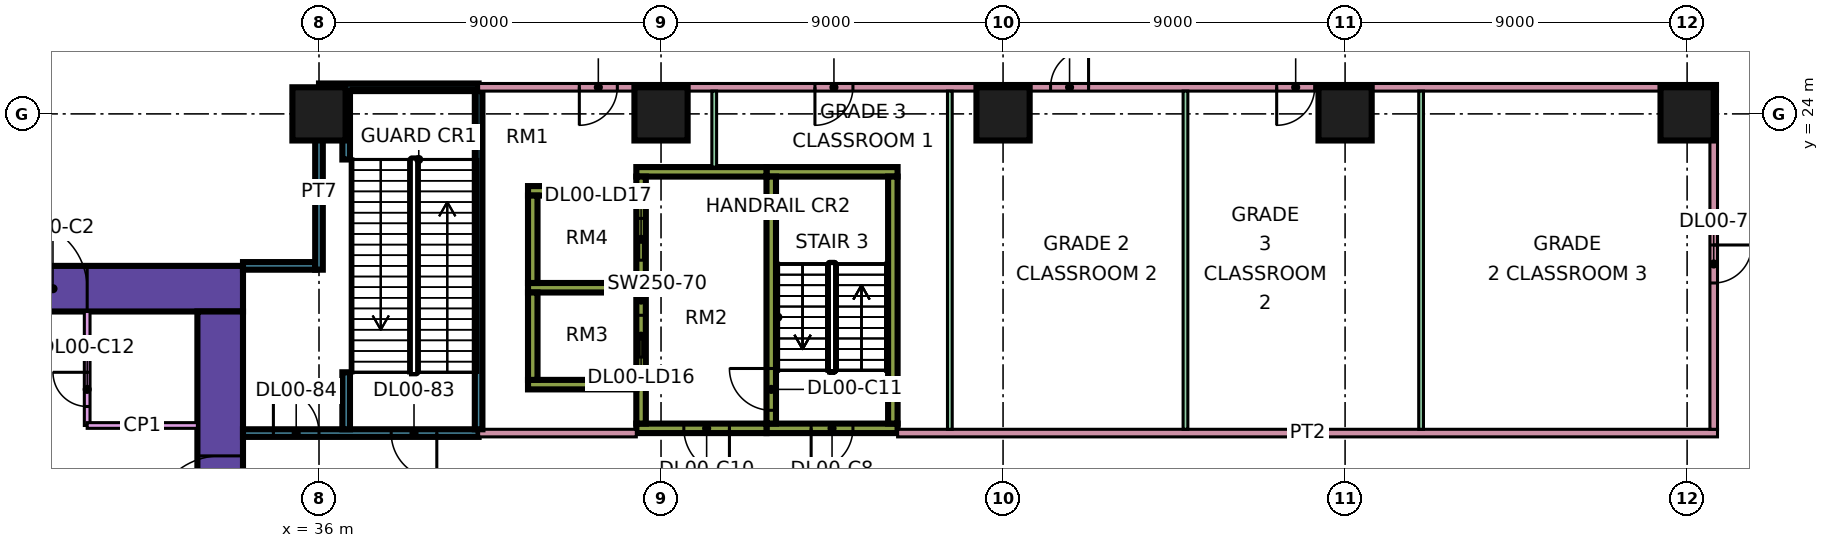
"""IFC4 building model, lengths in metres.
Left out: names, types, materials, properties, quantities, classifications, styles, units other than length and angle.
Written with IfcOpenShell. Run it as: python <this file> out.ifc"""

import sys

from ifc_helpers import new_model, si_unit, direction, frame, frame_2d, origin, origin_2d, place, context, subcontext, project, spatial, rectangle, extrude, element, fill, save


model = new_model("IFC4")
c1 = context("Model", 3, precision=1e-05, world=origin(), true_north=direction((0.0, 1.0)))
c2 = subcontext(c1, "Body", "Model", "MODEL_VIEW")
j1 = project(units=[si_unit("LENGTHUNIT", "METRE"), si_unit("PLANEANGLEUNIT", "RADIAN")], contexts=[c1])
p1 = place(None, origin())
s1 = spatial("IfcSite", under=j1, at=p1, CompositionType="ELEMENT")
p2 = place(p1, origin())
s2 = spatial("IfcBuilding", under=s1, at=p2, CompositionType="ELEMENT")
p3 = place(p2, origin())
s3 = spatial("IfcBuildingStorey", under=s2, at=p3, CompositionType="ELEMENT", Elevation=0.0)
for number, where, z_axis, x_axis in (
    (1, (36.0, 24.0, 0.0), (0.0, 0.0, 1.0), (1.0, 0.0, 0.0)),
    (2, (45.0, 24.0, 0.0), (0.0, 0.0, 1.0), (1.0, 0.0, 0.0)),
    (3, (54.0, 24.0, 0.0), (0.0, 0.0, 1.0), (1.0, 0.0, 0.0)),
    (4, (63.0, 24.0, 0.0), (0.0, 0.0, 1.0), (1.0, 0.0, 0.0)),
    (5, (72.0, 24.0, 0.0), (0.0, 0.0, 1.0), (1.0, 0.0, 0.0)),
):
    element("IfcColumn", number, at=place(p3, frame(where, z_axis=z_axis, x_axis=x_axis)), inside=s3, PredefinedType="COLUMN", context=c2, shape_type="SweptSolid", body=[
        extrude(rectangle(XDim=1.4, YDim=1.4, at=origin_2d()), origin(), (0.0, 0.0, 1.0), 7.2),
    ])
p4 = place(p3, frame((9.0, 19.4, 0.0), z_axis=(0.0, 0.0, 1.0), x_axis=(1.0, 0.0, 0.0)))
e6 = element("IfcWall", 6, at=p4, inside=s3, PredefinedType="SHEAR", context=c2, shape_type="SweptSolid", body=[
    extrude(rectangle(XDim=25.0, YDim=1.2, at=frame_2d((12.5, 0.0))), origin(), (0.0, 0.0, 1.0), 7.2),
])
p5 = place(p4, frame((19.1, 0.0, 0.0)))
e7 = element("IfcOpeningElement", 7, at=p5, cuts=e6, PredefinedType="OPENING", context=c2, shape_type="SweptSolid", body=[
    extrude(rectangle(XDim=1.8, YDim=2.4, at=frame_2d((0.9, 1.2))), frame((0.0, 0.61, 0.0), z_axis=(0.0, -1.0, 0.0), x_axis=(1.0, 0.0, 0.0)), (0.0, 0.0, 1.0), 1.22),
])
p6 = place(p3, frame((33.4, 8.2, 0.0), z_axis=(0.0, 0.0, 1.0), x_axis=(0.0, 1.0, 0.0)))
e8 = element("IfcWall", 8, at=p6, inside=s3, PredefinedType="SHEAR", context=c2, shape_type="SweptSolid", body=[
    extrude(rectangle(XDim=10.6, YDim=1.2, at=frame_2d((5.3, 0.0))), origin(), (0.0, 0.0, 1.0), 7.2),
])
p7 = place(p6, frame((5.0, 0.0, 0.0)))
e9 = element("IfcOpeningElement", 9, at=p7, cuts=e8, PredefinedType="OPENING", context=c2, shape_type="SweptSolid", body=[
    extrude(rectangle(XDim=1.8, YDim=2.4, at=frame_2d((0.9, 1.2))), frame((0.0, 0.61, 0.0), z_axis=(0.0, -1.0, 0.0), x_axis=(1.0, 0.0, 0.0)), (0.0, 0.0, 1.0), 1.22),
])
p8 = place(p3, frame((47.775, 15.725, 0.0), z_axis=(0.0, 0.0, 1.0), x_axis=(1.0, 0.0, 0.0)))
e10 = element("IfcWall", 10, at=p8, inside=s3, PredefinedType="SHEAR", context=c2, shape_type="SweptSolid", body=[
    extrude(rectangle(XDim=3.45, YDim=0.25, at=frame_2d((1.725, 0.0))), origin(), (0.0, 0.0, 1.0), 7.2),
])
p9 = place(p8, frame((1.175, 0.0, 0.0)))
e11 = element("IfcOpeningElement", 11, at=p9, cuts=e10, PredefinedType="OPENING", context=c2, shape_type="SweptSolid", body=[
    extrude(rectangle(XDim=1.1, YDim=2.2, at=frame_2d((0.55, 1.1))), frame((0.0, 0.135, 0.0), z_axis=(0.0, -1.0, 0.0), x_axis=(1.0, 0.0, 0.0)), (0.0, 0.0, 1.0), 0.27),
])
p10 = place(p3, frame((47.775, 22.475, 0.0), z_axis=(0.0, 0.0, 1.0), x_axis=(1.0, 0.0, 0.0)))
e12 = element("IfcWall", 12, at=p10, inside=s3, PredefinedType="SHEAR", context=c2, shape_type="SweptSolid", body=[
    extrude(rectangle(XDim=3.45, YDim=0.25, at=frame_2d((1.725, 0.0))), origin(), (0.0, 0.0, 1.0), 7.2),
])
p11 = place(p3, frame((47.9, 15.85, 0.0), z_axis=(0.0, 0.0, 1.0), x_axis=(0.0, 1.0, 0.0)))
e13 = element("IfcWall", 13, at=p11, inside=s3, PredefinedType="SHEAR", context=c2, shape_type="SweptSolid", body=[
    extrude(rectangle(XDim=6.5, YDim=0.25, at=frame_2d((3.25, 0.0))), origin(), (0.0, 0.0, 1.0), 7.2),
])
p12 = place(p11, frame((0.35, 0.0, 0.0)))
e14 = element("IfcOpeningElement", 14, at=p12, cuts=e13, PredefinedType="OPENING", context=c2, shape_type="SweptSolid", body=[
    extrude(rectangle(XDim=1.1, YDim=2.2, at=frame_2d((0.55, 1.1))), frame((0.0, 0.135, 0.0), z_axis=(0.0, -1.0, 0.0), x_axis=(1.0, 0.0, 0.0)), (0.0, 0.0, 1.0), 0.27),
])
p13 = place(p3, frame((51.1, 15.85, 0.0), z_axis=(0.0, 0.0, 1.0), x_axis=(0.0, 1.0, 0.0)))
e15 = element("IfcWall", 15, at=p13, inside=s3, PredefinedType="SHEAR", context=c2, shape_type="SweptSolid", body=[
    extrude(rectangle(XDim=6.5, YDim=0.25, at=frame_2d((3.25, 0.0))), origin(), (0.0, 0.0, 1.0), 7.2),
])
p14 = place(p3, frame((44.35, 15.725, 0.0), z_axis=(0.0, 0.0, 1.0), x_axis=(1.0, 0.0, 0.0)))
e16 = element("IfcWall", 16, at=p14, inside=s3, PredefinedType="SHEAR", context=c2, shape_type="SweptSolid", body=[
    extrude(rectangle(XDim=3.425, YDim=0.25, at=frame_2d((1.712, 0.0))), origin(), (0.0, 0.0, 1.0), 7.2),
])
p15 = place(p14, frame((1.25, 0.0, 0.0)))
e17 = element("IfcOpeningElement", 17, at=p15, cuts=e16, PredefinedType="OPENING", context=c2, shape_type="SweptSolid", body=[
    extrude(rectangle(XDim=1.2, YDim=2.2, at=frame_2d((0.6, 1.1))), frame((0.0, 0.135, 0.0), z_axis=(0.0, -1.0, 0.0), x_axis=(1.0, 0.0, 0.0)), (0.0, 0.0, 1.0), 0.27),
])
p16 = place(p3, frame((44.35, 22.475, 0.0), z_axis=(0.0, 0.0, 1.0), x_axis=(1.0, 0.0, 0.0)))
e18 = element("IfcWall", 18, at=p16, inside=s3, PredefinedType="SHEAR", context=c2, shape_type="SweptSolid", body=[
    extrude(rectangle(XDim=3.425, YDim=0.25, at=frame_2d((1.712, 0.0))), origin(), (0.0, 0.0, 1.0), 7.2),
])
p17 = place(p3, frame((44.475, 15.85, 0.0), z_axis=(0.0, 0.0, 1.0), x_axis=(0.0, 1.0, 0.0)))
e19 = element("IfcWall", 19, at=p17, inside=s3, PredefinedType="SHEAR", context=c2, shape_type="SweptSolid", body=[
    extrude(rectangle(XDim=6.5, YDim=0.25, at=frame_2d((3.25, 0.0))), origin(), (0.0, 0.0, 1.0), 7.2),
])
p18 = place(p17, frame((1.75, 0.0, 0.0)))
e20 = element("IfcOpeningElement", 20, at=p18, cuts=e19, PredefinedType="OPENING", context=c2, shape_type="SweptSolid", body=[
    extrude(rectangle(XDim=1.1, YDim=2.2, at=frame_2d((0.55, 1.1))), frame((0.0, 0.135, 0.0), z_axis=(0.0, -1.0, 0.0), x_axis=(1.0, 0.0, 0.0)), (0.0, 0.0, 1.0), 0.27),
])
p19 = place(p17, frame((4.3, 0.0, 0.0)))
e21 = element("IfcOpeningElement", 21, at=p19, cuts=e19, PredefinedType="OPENING", context=c2, shape_type="SweptSolid", body=[
    extrude(rectangle(XDim=1.1, YDim=2.2, at=frame_2d((0.55, 1.1))), frame((0.0, 0.135, 0.0), z_axis=(0.0, -1.0, 0.0), x_axis=(1.0, 0.0, 0.0)), (0.0, 0.0, 1.0), 0.27),
])
for number, where, z_axis, x_axis in (
    (22, (41.5, 16.875, 0.0), (0.0, 0.0, 1.0), (1.0, 0.0, 0.0)),
    (23, (41.5, 19.425, 0.0), (0.0, 0.0, 1.0), (1.0, 0.0, 0.0)),
    (24, (41.5, 21.975, 0.0), (0.0, 0.0, 1.0), (1.0, 0.0, 0.0)),
):
    element("IfcWall", number, at=place(p3, frame(where, z_axis=z_axis, x_axis=x_axis)), inside=s3, PredefinedType="SHEAR", context=c2, shape_type="SweptSolid", body=[
        extrude(rectangle(XDim=2.85, YDim=0.25, at=frame_2d((1.425, 0.0))), origin(), (0.0, 0.0, 1.0), 7.2),
    ])
for number, where, z_axis, x_axis in (
    (25, (41.625, 17.0, 0.0), (0.0, 0.0, 1.0), (0.0, 1.0, 0.0)),
    (26, (41.625, 19.55, 0.0), (0.0, 0.0, 1.0), (0.0, 1.0, 0.0)),
):
    element("IfcWall", number, at=place(p3, frame(where, z_axis=z_axis, x_axis=x_axis)), inside=s3, PredefinedType="SHEAR", context=c2, shape_type="SweptSolid", body=[
        extrude(rectangle(XDim=2.3, YDim=0.25, at=frame_2d((1.15, 0.0))), origin(), (0.0, 0.0, 1.0), 7.2),
    ])
p20 = place(p3, frame((29.9, 15.8, 0.0), z_axis=(0.0, 0.0, 1.0), x_axis=(0.0, 1.0, 0.0)))
e27 = element("IfcWall", 27, at=p20, inside=s3, PredefinedType="PARTITIONING", context=c2, shape_type="SweptSolid", body=[
    extrude(rectangle(XDim=3.0, YDim=0.15, at=frame_2d((1.5, 0.0))), origin(), (0.0, 0.0, 1.0), 6.8),
])
p21 = place(p20, frame((0.5, 0.0, 0.0)))
e28 = element("IfcOpeningElement", 28, at=p21, cuts=e27, PredefinedType="OPENING", context=c2, shape_type="SweptSolid", body=[
    extrude(rectangle(XDim=0.9, YDim=2.1, at=frame_2d((0.45, 1.05))), frame((0.0, 0.085, 0.0), z_axis=(0.0, -1.0, 0.0), x_axis=(1.0, 0.0, 0.0)), (0.0, 0.0, 1.0), 0.17),
])
p22 = place(p3, frame((29.9, 15.8, 0.0), z_axis=(0.0, 0.0, 1.0), x_axis=(1.0, 0.0, 0.0)))
e29 = element("IfcWall", 29, at=p22, inside=s3, PredefinedType="PARTITIONING", context=c2, shape_type="SweptSolid", body=[
    extrude(rectangle(XDim=2.9, YDim=0.15, at=frame_2d((1.45, 0.0))), origin(), (0.0, 0.0, 1.0), 6.8),
])
p23 = place(p3, frame((34.0, 15.6, 0.0), z_axis=(0.0, 0.0, 1.0), x_axis=(1.0, 0.0, 0.0)))
e30 = element("IfcWall", 30, at=p23, inside=s3, PredefinedType="SOLIDWALL", context=c2, shape_type="SweptSolid", body=[
    extrude(rectangle(XDim=6.2, YDim=0.2, at=frame_2d((3.1, 0.0))), origin(), (0.0, 0.0, 1.0), 6.8),
])
p24 = place(p23, frame((3.9, 0.0, 0.0)))
e31 = element("IfcOpeningElement", 31, at=p24, cuts=e30, PredefinedType="OPENING", context=c2, shape_type="SweptSolid", body=[
    extrude(rectangle(XDim=1.2, YDim=2.1, at=frame_2d((0.6, 1.05))), frame((0.0, 0.11, 0.0), z_axis=(0.0, -1.0, 0.0), x_axis=(1.0, 0.0, 0.0)), (0.0, 0.0, 1.0), 0.22),
])
p25 = place(p23, frame((0.8, 0.0, 0.0)))
e32 = element("IfcOpeningElement", 32, at=p25, cuts=e30, PredefinedType="OPENING", context=c2, shape_type="SweptSolid", body=[
    extrude(rectangle(XDim=1.2, YDim=2.1, at=frame_2d((0.6, 1.05))), frame((0.0, 0.11, 0.0), z_axis=(0.0, -1.0, 0.0), x_axis=(1.0, 0.0, 0.0)), (0.0, 0.0, 1.0), 0.22),
])
p26 = place(p3, frame((34.0, 20.0, 0.0), z_axis=(0.0, 0.0, 1.0), x_axis=(1.0, 0.0, 0.0)))
e33 = element("IfcWall", 33, at=p26, inside=s3, PredefinedType="SOLIDWALL", context=c2, shape_type="SweptSolid", body=[
    extrude(rectangle(XDim=1.9, YDim=0.2, at=frame_2d((0.95, 0.0))), origin(), (0.0, 0.0, 1.0), 6.8),
])
p27 = place(p3, frame((36.0, 19.9, 0.0), z_axis=(0.0, 0.0, 1.0), x_axis=(0.0, 1.0, 0.0)))
e34 = element("IfcWall", 34, at=p27, inside=s3, PredefinedType="SOLIDWALL", context=c2, shape_type="SweptSolid", body=[
    extrude(rectangle(XDim=4.1, YDim=0.2, at=frame_2d((2.05, 0.0))), origin(), (0.0, 0.0, 1.0), 6.8),
])
p28 = place(p3, frame((36.0, 24.7, 0.0), z_axis=(0.0, 0.0, 1.0), x_axis=(1.0, 0.0, 0.0)))
e35 = element("IfcWall", 35, at=p28, inside=s3, PredefinedType="SOLIDWALL", context=c2, shape_type="SweptSolid", body=[
    extrude(rectangle(XDim=4.2, YDim=0.2, at=frame_2d((2.1, 0.0))), origin(), (0.0, 0.0, 1.0), 6.8),
])
p29 = place(p3, frame((40.2, 15.6, 0.0), z_axis=(0.0, 0.0, 1.0), x_axis=(1.0, 0.0, 0.0)))
e36 = element("IfcWall", 36, at=p29, inside=s3, PredefinedType="PARTITIONING", context=c2, shape_type="SweptSolid", body=[
    extrude(rectangle(XDim=4.15, YDim=0.2, at=frame_2d((2.075, 0.0))), origin(), (0.0, 0.0, 1.0), 6.8),
])
p30 = place(p3, frame((40.2, 15.7, 0.0), z_axis=(0.0, 0.0, 1.0), x_axis=(0.0, 1.0, 0.0)))
e37 = element("IfcWall", 37, at=p30, inside=s3, PredefinedType="SOLIDWALL", context=c2, shape_type="SweptSolid", body=[
    extrude(rectangle(XDim=8.9, YDim=0.2, at=frame_2d((4.45, 0.0))), origin(), (0.0, 0.0, 1.0), 6.8),
])
p31 = place(p3, frame((40.2, 24.7, 0.0), z_axis=(0.0, 0.0, 1.0), x_axis=(1.0, 0.0, 0.0)))
e38 = element("IfcWall", 38, at=p31, inside=s3, PredefinedType="PARTITIONING", context=c2, shape_type="SweptSolid", body=[
    extrude(rectangle(XDim=32.6, YDim=0.2, at=frame_2d((16.3, 0.0))), origin(), (0.0, 0.0, 1.0), 6.8),
])
p32 = place(p31, frame((2.65, 0.0, 0.0)))
e39 = element("IfcOpeningElement", 39, at=p32, cuts=e38, PredefinedType="OPENING", context=c2, shape_type="SweptSolid", body=[
    extrude(rectangle(XDim=1.0, YDim=2.1, at=frame_2d((0.5, 1.05))), frame((0.0, 0.11, 0.0), z_axis=(0.0, -1.0, 0.0), x_axis=(1.0, 0.0, 0.0)), (0.0, 0.0, 1.0), 0.22),
])
p33 = place(p31, frame((8.85, 0.0, 0.0)))
e40 = element("IfcOpeningElement", 40, at=p33, cuts=e38, PredefinedType="OPENING", context=c2, shape_type="SweptSolid", body=[
    extrude(rectangle(XDim=1.0, YDim=2.1, at=frame_2d((0.5, 1.05))), frame((0.0, 0.11, 0.0), z_axis=(0.0, -1.0, 0.0), x_axis=(1.0, 0.0, 0.0)), (0.0, 0.0, 1.0), 0.22),
])
p34 = place(p31, frame((15.05, 0.0, 0.0)))
e41 = element("IfcOpeningElement", 41, at=p34, cuts=e38, PredefinedType="OPENING", context=c2, shape_type="SweptSolid", body=[
    extrude(rectangle(XDim=1.0, YDim=2.1, at=frame_2d((0.5, 1.05))), frame((0.0, 0.11, 0.0), z_axis=(0.0, -1.0, 0.0), x_axis=(1.0, 0.0, 0.0)), (0.0, 0.0, 1.0), 0.22),
])
p35 = place(p31, frame((21.0, 0.0, 0.0)))
e42 = element("IfcOpeningElement", 42, at=p35, cuts=e38, PredefinedType="OPENING", context=c2, shape_type="SweptSolid", body=[
    extrude(rectangle(XDim=1.0, YDim=2.1, at=frame_2d((0.5, 1.05))), frame((0.0, 0.11, 0.0), z_axis=(0.0, -1.0, 0.0), x_axis=(1.0, 0.0, 0.0)), (0.0, 0.0, 1.0), 0.22),
])
p36 = place(p3, frame((46.4, 22.6, 0.0), z_axis=(0.0, 0.0, 1.0), x_axis=(0.0, 1.0, 0.0)))
e43 = element("IfcWall", 43, at=p36, inside=s3, PredefinedType="PARTITIONING", context=c2, shape_type="SweptSolid", body=[
    extrude(rectangle(XDim=2.0, YDim=0.125, at=frame_2d((1.0, 0.0))), origin(), (0.0, 0.0, 1.0), 6.8),
])
p37 = place(p3, frame((51.225, 15.6, 0.0), z_axis=(0.0, 0.0, 1.0), x_axis=(1.0, 0.0, 0.0)))
e44 = element("IfcWall", 44, at=p37, inside=s3, PredefinedType="PARTITIONING", context=c2, shape_type="SweptSolid", body=[
    extrude(rectangle(XDim=21.575, YDim=0.2, at=frame_2d((10.788, 0.0))), origin(), (0.0, 0.0, 1.0), 6.8),
])
for number, where, z_axis, x_axis in (
    (45, (52.6, 15.7, 0.0), (0.0, 0.0, 1.0), (0.0, 1.0, 0.0)),
    (46, (58.8, 15.7, 0.0), (0.0, 0.0, 1.0), (0.0, 1.0, 0.0)),
    (47, (65.0, 15.7, 0.0), (0.0, 0.0, 1.0), (0.0, 1.0, 0.0)),
):
    element("IfcWall", number, at=place(p3, frame(where, z_axis=z_axis, x_axis=x_axis)), inside=s3, PredefinedType="PARTITIONING", context=c2, shape_type="SweptSolid", body=[
        extrude(rectangle(XDim=8.9, YDim=0.125, at=frame_2d((4.45, 0.0))), origin(), (0.0, 0.0, 1.0), 6.8),
    ])
p38 = place(p3, frame((72.7, 15.7, 0.0), z_axis=(0.0, 0.0, 1.0), x_axis=(0.0, 1.0, 0.0)))
e48 = element("IfcWall", 48, at=p38, inside=s3, PredefinedType="PARTITIONING", context=c2, shape_type="SweptSolid", body=[
    extrude(rectangle(XDim=8.9, YDim=0.2, at=frame_2d((4.45, 0.0))), origin(), (0.0, 0.0, 1.0), 6.8),
])
p39 = place(p38, frame((3.85, 0.0, 0.0)))
e49 = element("IfcOpeningElement", 49, at=p39, cuts=e48, PredefinedType="OPENING", context=c2, shape_type="SweptSolid", body=[
    extrude(rectangle(XDim=1.0, YDim=2.1, at=frame_2d((0.5, 1.05))), frame((0.0, 0.11, 0.0), z_axis=(0.0, -1.0, 0.0), x_axis=(1.0, 0.0, 0.0)), (0.0, 0.0, 1.0), 0.22),
])
p40 = place(p3, frame((36.715, 22.8, 0.0), z_axis=(0.0, 0.0, 1.0), x_axis=(0.0, 1.0, 0.0)))
e50 = element("IfcWall", 50, at=p40, inside=s3, PredefinedType="SOLIDWALL", context=c2, shape_type="SweptSolid", body=[
    extrude(rectangle(XDim=1.8, YDim=0.2, at=frame_2d((0.9, 0.0))), origin(), (0.0, 0.0, 1.0), 6.8),
])
p41 = place(p3, frame((36.715, 15.7, 0.0), z_axis=(0.0, 0.0, 1.0), x_axis=(0.0, 1.0, 0.0)))
e51 = element("IfcWall", 51, at=p41, inside=s3, PredefinedType="SOLIDWALL", context=c2, shape_type="SweptSolid", body=[
    extrude(rectangle(XDim=1.5, YDim=0.2, at=frame_2d((0.75, 0.0))), origin(), (0.0, 0.0, 1.0), 6.8),
])
p42 = place(p7, origin())
e52 = element("IfcDoor", 52, at=p42, inside=s3, OperationType="DOUBLE_DOOR_SINGLE_SWING", PredefinedType="DOOR", context=c2, shape_type="SweptSolid", body=[
    extrude(rectangle(XDim=1.8, YDim=2.4, at=frame_2d((0.9, 1.2))), frame((0.0, 0.025, 0.0), z_axis=(0.0, -1.0, 0.0), x_axis=(1.0, 0.0, 0.0)), (0.0, 0.0, 1.0), 0.05),
])
fill(e9, e52)
p43 = place(p5, origin())
e53 = element("IfcDoor", 53, at=p43, inside=s3, OperationType="DOUBLE_DOOR_SINGLE_SWING", PredefinedType="DOOR", context=c2, shape_type="SweptSolid", body=[
    extrude(rectangle(XDim=1.8, YDim=2.4, at=frame_2d((0.9, 1.2))), frame((0.0, 0.025, 0.0), z_axis=(0.0, -1.0, 0.0), x_axis=(1.0, 0.0, 0.0)), (0.0, 0.0, 1.0), 0.05),
])
fill(e7, e53)
p44 = place(p9, frame((1.1, 0.0, 0.0), z_axis=(0.0, 0.0, 1.0), x_axis=(-1.0, 0.0, 0.0)))
e54 = element("IfcDoor", 54, at=p44, inside=s3, OperationType="SINGLE_SWING_LEFT", PredefinedType="DOOR", context=c2, shape_type="SweptSolid", body=[
    extrude(rectangle(XDim=1.1, YDim=2.2, at=frame_2d((0.55, 1.1))), frame((0.0, 0.025, 0.0), z_axis=(0.0, -1.0, 0.0), x_axis=(1.0, 0.0, 0.0)), (0.0, 0.0, 1.0), 0.05),
])
fill(e11, e54)
p45 = place(p15, origin())
e55 = element("IfcDoor", 55, at=p45, inside=s3, OperationType="SINGLE_SWING_RIGHT", PredefinedType="DOOR", context=c2, shape_type="SweptSolid", body=[
    extrude(rectangle(XDim=1.2, YDim=2.2, at=frame_2d((0.6, 1.1))), frame((0.0, 0.025, 0.0), z_axis=(0.0, -1.0, 0.0), x_axis=(1.0, 0.0, 0.0)), (0.0, 0.0, 1.0), 0.05),
])
fill(e17, e55)
p46 = place(p12, frame((1.1, 0.0, 0.0), z_axis=(0.0, 0.0, 1.0), x_axis=(-1.0, 0.0, 0.0)))
e56 = element("IfcDoor", 56, at=p46, inside=s3, OperationType="SINGLE_SWING_RIGHT", PredefinedType="DOOR", context=c2, shape_type="SweptSolid", body=[
    extrude(rectangle(XDim=1.1, YDim=2.2, at=frame_2d((0.55, 1.1))), frame((0.0, 0.025, 0.0), z_axis=(0.0, -1.0, 0.0), x_axis=(1.0, 0.0, 0.0)), (0.0, 0.0, 1.0), 0.05),
])
fill(e14, e56)
p47 = place(p18, origin())
e57 = element("IfcDoor", 57, at=p47, inside=s3, OperationType="DOUBLE_DOOR_SLIDING", PredefinedType="DOOR", context=c2, shape_type="SweptSolid", body=[
    extrude(rectangle(XDim=1.1, YDim=2.2, at=frame_2d((0.55, 1.1))), frame((0.0, 0.025, 0.0), z_axis=(0.0, -1.0, 0.0), x_axis=(1.0, 0.0, 0.0)), (0.0, 0.0, 1.0), 0.05),
])
fill(e20, e57)
p48 = place(p19, origin())
e58 = element("IfcDoor", 58, at=p48, inside=s3, OperationType="DOUBLE_DOOR_SLIDING", PredefinedType="DOOR", context=c2, shape_type="SweptSolid", body=[
    extrude(rectangle(XDim=1.1, YDim=2.2, at=frame_2d((0.55, 1.1))), frame((0.0, 0.025, 0.0), z_axis=(0.0, -1.0, 0.0), x_axis=(1.0, 0.0, 0.0)), (0.0, 0.0, 1.0), 0.05),
])
fill(e21, e58)
p49 = place(p21, frame((0.9, 0.0, 0.0), z_axis=(0.0, 0.0, 1.0), x_axis=(-1.0, 0.0, 0.0)))
e59 = element("IfcDoor", 59, at=p49, inside=s3, OperationType="SINGLE_SWING_RIGHT", PredefinedType="DOOR", context=c2, shape_type="SweptSolid", body=[
    extrude(rectangle(XDim=0.9, YDim=2.1, at=frame_2d((0.45, 1.05))), frame((0.0, 0.025, 0.0), z_axis=(0.0, -1.0, 0.0), x_axis=(1.0, 0.0, 0.0)), (0.0, 0.0, 1.0), 0.05),
])
fill(e28, e59)
p50 = place(p32, frame((1.0, 0.0, 0.0), z_axis=(0.0, 0.0, 1.0), x_axis=(-1.0, 0.0, 0.0)))
e60 = element("IfcDoor", 60, at=p50, inside=s3, OperationType="SINGLE_SWING_LEFT", PredefinedType="DOOR", context=c2, shape_type="SweptSolid", body=[
    extrude(rectangle(XDim=1.0, YDim=2.1, at=frame_2d((0.5, 1.05))), frame((0.0, 0.025, 0.0), z_axis=(0.0, -1.0, 0.0), x_axis=(1.0, 0.0, 0.0)), (0.0, 0.0, 1.0), 0.05),
])
fill(e39, e60)
p51 = place(p33, frame((1.0, 0.0, 0.0), z_axis=(0.0, 0.0, 1.0), x_axis=(-1.0, 0.0, 0.0)))
e61 = element("IfcDoor", 61, at=p51, inside=s3, OperationType="SINGLE_SWING_LEFT", PredefinedType="DOOR", context=c2, shape_type="SweptSolid", body=[
    extrude(rectangle(XDim=1.0, YDim=2.1, at=frame_2d((0.5, 1.05))), frame((0.0, 0.025, 0.0), z_axis=(0.0, -1.0, 0.0), x_axis=(1.0, 0.0, 0.0)), (0.0, 0.0, 1.0), 0.05),
])
fill(e40, e61)
p52 = place(p34, frame((1.0, 0.0, 0.0), z_axis=(0.0, 0.0, 1.0), x_axis=(-1.0, 0.0, 0.0)))
e62 = element("IfcDoor", 62, at=p52, inside=s3, OperationType="SINGLE_SWING_RIGHT", PredefinedType="DOOR", context=c2, shape_type="SweptSolid", body=[
    extrude(rectangle(XDim=1.0, YDim=2.1, at=frame_2d((0.5, 1.05))), frame((0.0, 0.025, 0.0), z_axis=(0.0, -1.0, 0.0), x_axis=(1.0, 0.0, 0.0)), (0.0, 0.0, 1.0), 0.05),
])
fill(e41, e62)
p53 = place(p35, frame((1.0, 0.0, 0.0), z_axis=(0.0, 0.0, 1.0), x_axis=(-1.0, 0.0, 0.0)))
e63 = element("IfcDoor", 63, at=p53, inside=s3, OperationType="SINGLE_SWING_LEFT", PredefinedType="DOOR", context=c2, shape_type="SweptSolid", body=[
    extrude(rectangle(XDim=1.0, YDim=2.1, at=frame_2d((0.5, 1.05))), frame((0.0, 0.025, 0.0), z_axis=(0.0, -1.0, 0.0), x_axis=(1.0, 0.0, 0.0)), (0.0, 0.0, 1.0), 0.05),
])
fill(e42, e63)
p54 = place(p39, origin())
e64 = element("IfcDoor", 64, at=p54, inside=s3, OperationType="SINGLE_SWING_RIGHT", PredefinedType="DOOR", context=c2, shape_type="SweptSolid", body=[
    extrude(rectangle(XDim=1.0, YDim=2.1, at=frame_2d((0.5, 1.05))), frame((0.0, 0.025, 0.0), z_axis=(0.0, -1.0, 0.0), x_axis=(1.0, 0.0, 0.0)), (0.0, 0.0, 1.0), 0.05),
])
fill(e49, e64)
p55 = place(p24, origin())
e65 = element("IfcDoor", 65, at=p55, inside=s3, OperationType="SINGLE_SWING_RIGHT", PredefinedType="DOOR", context=c2, shape_type="SweptSolid", body=[
    extrude(rectangle(XDim=1.2, YDim=2.1, at=frame_2d((0.6, 1.05))), frame((0.0, 0.025, 0.0), z_axis=(0.0, -1.0, 0.0), x_axis=(1.0, 0.0, 0.0)), (0.0, 0.0, 1.0), 0.05),
])
fill(e31, e65)
p56 = place(p25, origin())
e66 = element("IfcDoor", 66, at=p56, inside=s3, OperationType="SINGLE_SWING_LEFT", PredefinedType="DOOR", context=c2, shape_type="SweptSolid", body=[
    extrude(rectangle(XDim=1.2, YDim=2.1, at=frame_2d((0.6, 1.05))), frame((0.0, 0.025, 0.0), z_axis=(0.0, -1.0, 0.0), x_axis=(1.0, 0.0, 0.0)), (0.0, 0.0, 1.0), 0.05),
])
fill(e32, e66)
save(model, sys.argv[1])
